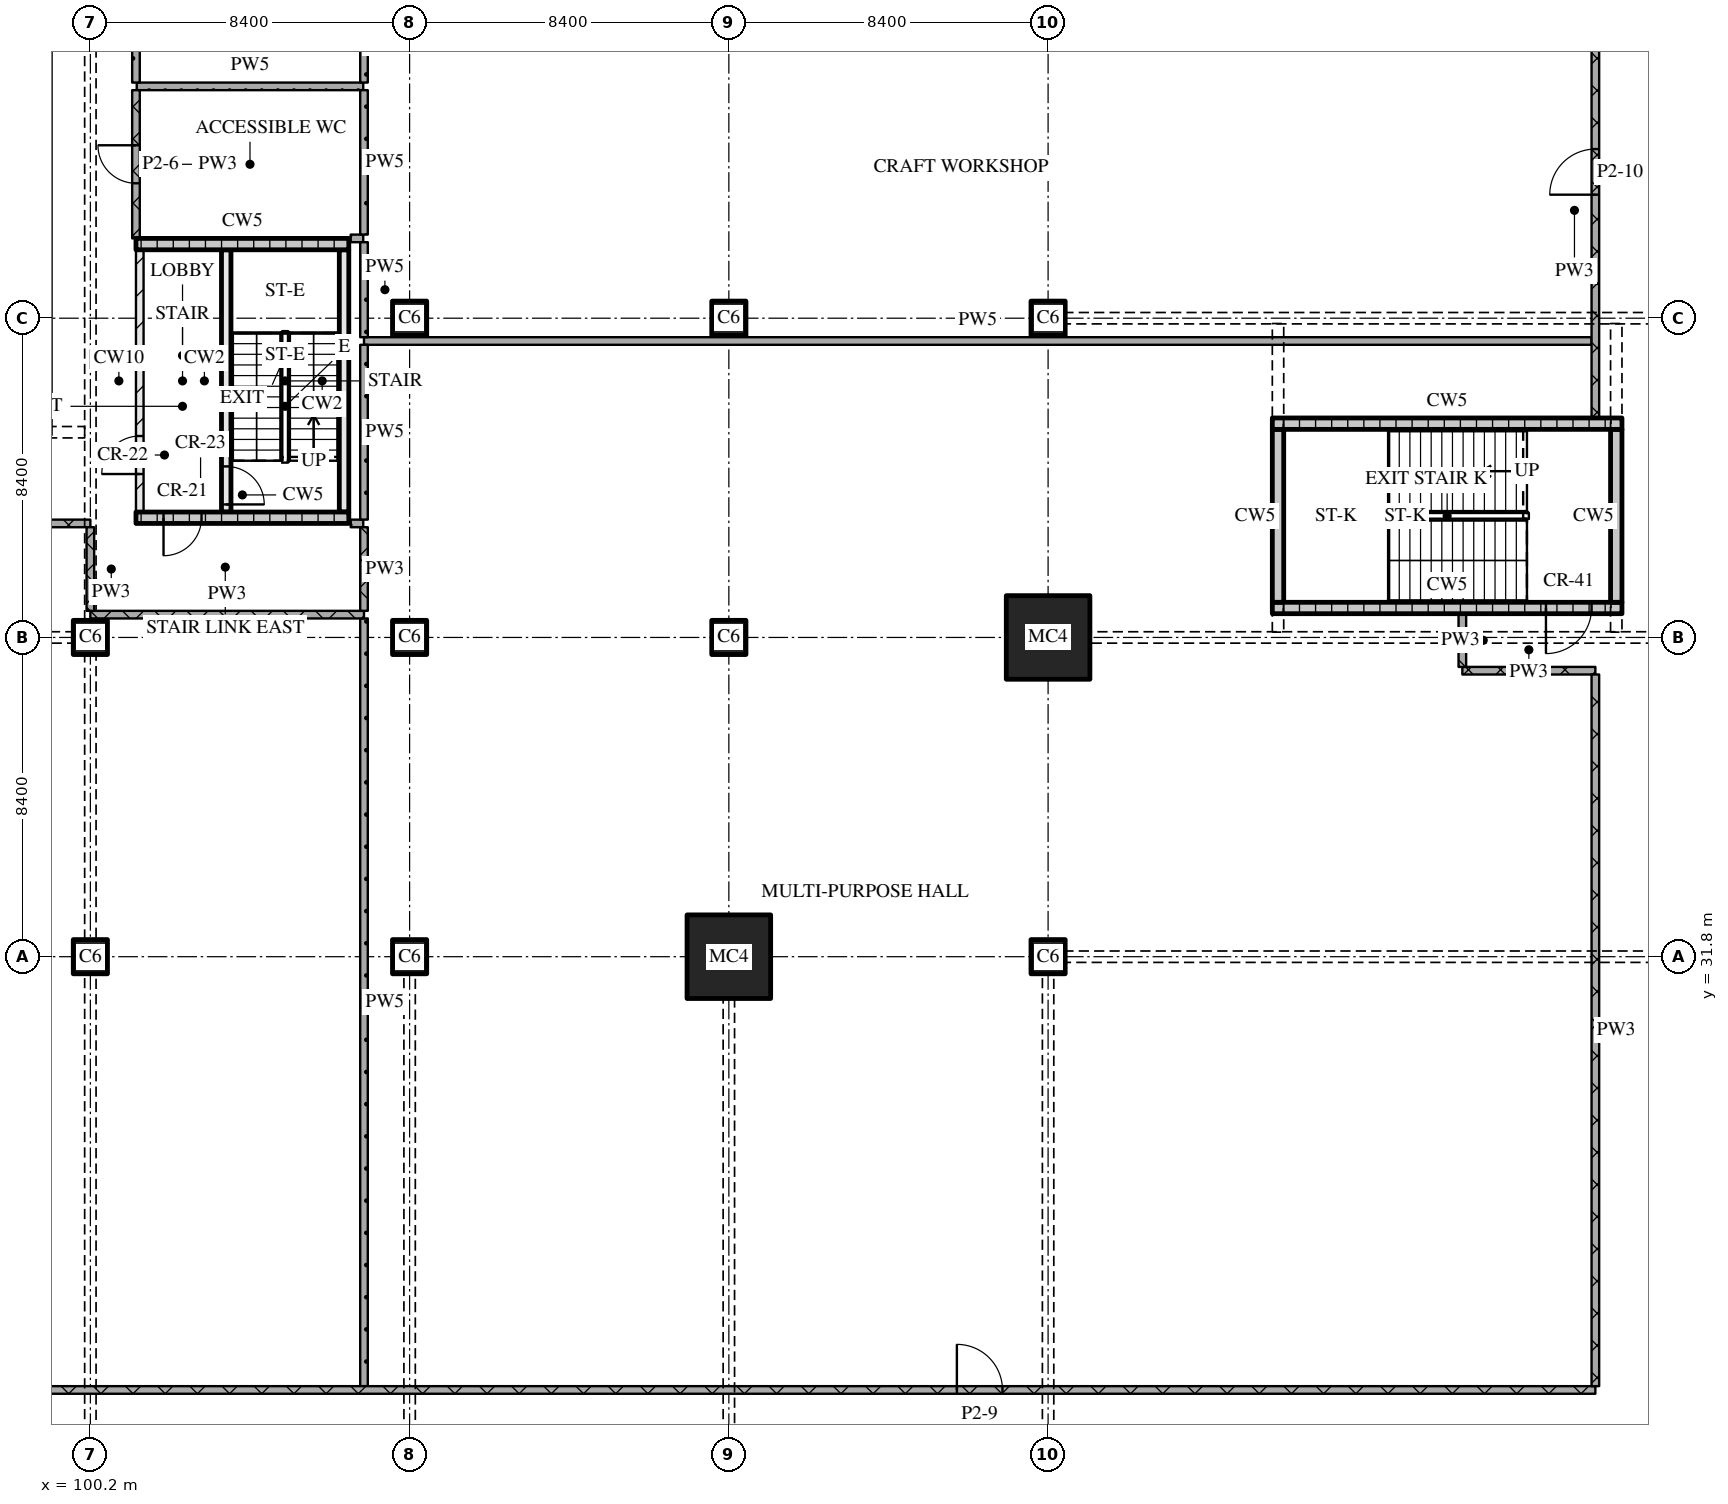
"""IFC4 building model, lengths in metres.
Left out: names, types, materials, properties, quantities, classifications, styles, units other than length and angle.
Written with IfcOpenShell. Run it as: python <this file> out.ifc"""

import sys

from ifc_helpers import new_model, si_unit, direction, frame, frame_2d, origin, origin_2d, place, context, subcontext, project, spatial, rectangle, extrude, element, fill, save


model = new_model("IFC4")
c1 = context("Model", 3, precision=1e-05, world=origin(), true_north=direction((0.0, 1.0)))
c2 = subcontext(c1, "Body", "Model", "MODEL_VIEW")
j1 = project(units=[si_unit("LENGTHUNIT", "METRE"), si_unit("PLANEANGLEUNIT", "RADIAN")], contexts=[c1])
p1 = place(None, origin())
s1 = spatial("IfcSite", under=j1, at=p1, CompositionType="ELEMENT")
p2 = place(p1, origin())
s2 = spatial("IfcBuilding", under=s1, at=p2, CompositionType="ELEMENT")
p3 = place(p2, frame((0.0, 0.0, 14.4)))
s3 = spatial("IfcBuildingStorey", under=s2, at=p3, CompositionType="ELEMENT", Elevation=14.4)
for number, where, z_axis, x_axis in (
    (1, (100.2, 31.8, 0.0), (0.0, 0.0, 1.0), (1.0, 0.0, 0.0)),
    (2, (100.2, 40.2, 0.0), (0.0, 0.0, 1.0), (1.0, 0.0, 0.0)),
    (3, (108.6, 31.8, 0.0), (0.0, 0.0, 1.0), (1.0, 0.0, 0.0)),
    (4, (108.6, 40.2, 0.0), (0.0, 0.0, 1.0), (1.0, 0.0, 0.0)),
    (5, (108.6, 48.6, 0.0), (0.0, 0.0, 1.0), (1.0, 0.0, 0.0)),
):
    element("IfcColumn", number, at=place(p3, frame(where, z_axis=z_axis, x_axis=x_axis)), inside=s3, PredefinedType="COLUMN", context=c2, shape_type="SweptSolid", body=[
        extrude(rectangle(XDim=0.9, YDim=0.9, at=origin_2d()), origin(), (0.0, 0.0, 1.0), 4.8),
    ])
p4 = place(p3, frame((117.0, 31.8, 0.0), z_axis=(0.0, 0.0, 1.0), x_axis=(1.0, 0.0, 0.0)))
e6 = element("IfcColumn", 6, at=p4, inside=s3, PredefinedType="COLUMN", context=c2, shape_type="SweptSolid", body=[
    extrude(rectangle(XDim=2.2, YDim=2.2, at=origin_2d()), origin(), (0.0, 0.0, 1.0), 4.8),
])
for number, where, z_axis, x_axis in (
    (7, (117.0, 40.2, 0.0), (0.0, 0.0, 1.0), (1.0, 0.0, 0.0)),
    (8, (117.0, 48.6, 0.0), (0.0, 0.0, 1.0), (1.0, 0.0, 0.0)),
    (9, (125.4, 31.8, 0.0), (0.0, 0.0, 1.0), (1.0, 0.0, 0.0)),
):
    element("IfcColumn", number, at=place(p3, frame(where, z_axis=z_axis, x_axis=x_axis)), inside=s3, PredefinedType="COLUMN", context=c2, shape_type="SweptSolid", body=[
        extrude(rectangle(XDim=0.9, YDim=0.9, at=origin_2d()), origin(), (0.0, 0.0, 1.0), 4.8),
    ])
p5 = place(p3, frame((125.4, 40.2, 0.0), z_axis=(0.0, 0.0, 1.0), x_axis=(1.0, 0.0, 0.0)))
e10 = element("IfcColumn", 10, at=p5, inside=s3, PredefinedType="COLUMN", context=c2, shape_type="SweptSolid", body=[
    extrude(rectangle(XDim=2.2, YDim=2.2, at=origin_2d()), origin(), (0.0, 0.0, 1.0), 4.8),
])
p6 = place(p3, frame((125.4, 48.6, 0.0), z_axis=(0.0, 0.0, 1.0), x_axis=(1.0, 0.0, 0.0)))
e11 = element("IfcColumn", 11, at=p6, inside=s3, PredefinedType="COLUMN", context=c2, shape_type="SweptSolid", body=[
    extrude(rectangle(XDim=0.9, YDim=0.9, at=origin_2d()), origin(), (0.0, 0.0, 1.0), 4.8),
])
p7 = place(p3, frame((101.4, 43.35, 0.0), z_axis=(0.0, 0.0, 1.0), x_axis=(1.0, 0.0, 0.0)))
e12 = element("IfcWall", 12, at=p7, inside=s3, PredefinedType="SOLIDWALL", context=c2, shape_type="SweptSolid", body=[
    extrude(rectangle(XDim=5.6, YDim=0.3, at=frame_2d((2.8, 0.0))), origin(), (0.0, 0.0, 1.0), 4.5),
])
p8 = place(p7, frame((0.725, 0.0, 0.0)))
e13 = element("IfcOpeningElement", 13, at=p8, cuts=e12, PredefinedType="OPENING", context=c2, shape_type="SweptSolid", body=[
    extrude(rectangle(XDim=1.0, YDim=2.1, at=frame_2d((0.5, 1.05))), frame((0.0, 0.16, 0.0), z_axis=(0.0, -1.0, 0.0), x_axis=(1.0, 0.0, 0.0)), (0.0, 0.0, 1.0), 0.32),
])
p9 = place(p3, frame((101.5, 43.5, 0.0), z_axis=(0.0, 0.0, 1.0), x_axis=(0.0, 1.0, 0.0)))
e14 = element("IfcWall", 14, at=p9, inside=s3, PredefinedType="PARTITIONING", context=c2, shape_type="SweptSolid", body=[
    extrude(rectangle(XDim=6.9, YDim=0.2, at=frame_2d((3.45, 0.0))), origin(), (0.0, 0.0, 1.0), 4.5),
])
p10 = place(p9, frame((1.0, 0.0, 0.0)))
e15 = element("IfcOpeningElement", 15, at=p10, cuts=e14, PredefinedType="OPENING", context=c2, shape_type="SweptSolid", body=[
    extrude(rectangle(XDim=1.0, YDim=2.1, at=frame_2d((0.5, 1.05))), frame((0.0, 0.11, 0.0), z_axis=(0.0, -1.0, 0.0), x_axis=(1.0, 0.0, 0.0)), (0.0, 0.0, 1.0), 0.22),
])
p11 = place(p3, frame((103.775, 43.5, 0.0), z_axis=(0.0, 0.0, 1.0), x_axis=(0.0, 1.0, 0.0)))
e16 = element("IfcWall", 16, at=p11, inside=s3, PredefinedType="SOLIDWALL", context=c2, shape_type="SweptSolid", body=[
    extrude(rectangle(XDim=6.9, YDim=0.25, at=frame_2d((3.45, 0.0))), origin(), (0.0, 0.0, 1.0), 4.5),
])
p12 = place(p11, frame((0.2, 0.0, 0.0)))
e17 = element("IfcOpeningElement", 17, at=p12, cuts=e16, PredefinedType="OPENING", context=c2, shape_type="SweptSolid", body=[
    extrude(rectangle(XDim=1.0, YDim=2.1, at=frame_2d((0.5, 1.05))), frame((0.0, 0.135, 0.0), z_axis=(0.0, -1.0, 0.0), x_axis=(1.0, 0.0, 0.0)), (0.0, 0.0, 1.0), 0.27),
])
p13 = place(p3, frame((106.875, 43.5, 0.0), z_axis=(0.0, 0.0, 1.0), x_axis=(0.0, 1.0, 0.0)))
e18 = element("IfcWall", 18, at=p13, inside=s3, PredefinedType="SOLIDWALL", context=c2, shape_type="SweptSolid", body=[
    extrude(rectangle(XDim=6.9, YDim=0.25, at=frame_2d((3.45, 0.0))), origin(), (0.0, 0.0, 1.0), 4.5),
])
p14 = place(p3, frame((101.4, 50.55, 0.0), z_axis=(0.0, 0.0, 1.0), x_axis=(1.0, 0.0, 0.0)))
e19 = element("IfcWall", 19, at=p14, inside=s3, PredefinedType="SOLIDWALL", context=c2, shape_type="SweptSolid", body=[
    extrude(rectangle(XDim=5.6, YDim=0.3, at=frame_2d((2.8, 0.0))), origin(), (0.0, 0.0, 1.0), 4.5),
])
p15 = place(p3, frame((131.3, 40.975, 0.0), z_axis=(0.0, 0.0, 1.0), x_axis=(1.0, 0.0, 0.0)))
e20 = element("IfcWall", 20, at=p15, inside=s3, PredefinedType="SOLIDWALL", context=c2, shape_type="SweptSolid", body=[
    extrude(rectangle(XDim=9.2, YDim=0.3, at=frame_2d((4.6, 0.0))), origin(), (0.0, 0.0, 1.0), 4.5),
])
p16 = place(p15, frame((7.2, 0.0, 0.0)))
e21 = element("IfcOpeningElement", 21, at=p16, cuts=e20, PredefinedType="OPENING", context=c2, shape_type="SweptSolid", body=[
    extrude(rectangle(XDim=1.2, YDim=2.1, at=frame_2d((0.6, 1.05))), frame((0.0, 0.16, 0.0), z_axis=(0.0, -1.0, 0.0), x_axis=(1.0, 0.0, 0.0)), (0.0, 0.0, 1.0), 0.32),
])
for number, where, z_axis, x_axis in (
    (22, (131.45, 41.125, 0.0), (0.0, 0.0, 1.0), (0.0, 1.0, 0.0)),
    (23, (140.35, 41.125, 0.0), (0.0, 0.0, 1.0), (0.0, 1.0, 0.0)),
):
    element("IfcWall", number, at=place(p3, frame(where, z_axis=z_axis, x_axis=x_axis)), inside=s3, PredefinedType="SOLIDWALL", context=c2, shape_type="SweptSolid", body=[
        extrude(rectangle(XDim=4.55, YDim=0.3, at=frame_2d((2.275, 0.0))), origin(), (0.0, 0.0, 1.0), 4.5),
    ])
p17 = place(p3, frame((131.3, 45.825, 0.0), z_axis=(0.0, 0.0, 1.0), x_axis=(1.0, 0.0, 0.0)))
e24 = element("IfcWall", 24, at=p17, inside=s3, PredefinedType="SOLIDWALL", context=c2, shape_type="SweptSolid", body=[
    extrude(rectangle(XDim=9.2, YDim=0.3, at=frame_2d((4.6, 0.0))), origin(), (0.0, 0.0, 1.0), 4.5),
])
p18 = place(p3, frame((35.4, 20.4, 0.0), z_axis=(0.0, 0.0, 1.0), x_axis=(1.0, 0.0, 0.0)))
e25 = element("IfcWall", 25, at=p18, inside=s3, PredefinedType="PARTITIONING", context=c2, shape_type="SweptSolid", body=[
    extrude(rectangle(XDim=104.4, YDim=0.2, at=frame_2d((52.2, 0.0))), origin(), (0.0, 0.0, 1.0), 4.5),
])
p19 = place(p18, frame((41.9, 0.0, 0.0)))
e26 = element("IfcOpeningElement", 26, at=p19, cuts=e25, PredefinedType="OPENING", context=c2, shape_type="SweptSolid", body=[
    extrude(rectangle(XDim=1.2, YDim=2.1, at=frame_2d((0.6, 1.05))), frame((0.0, 0.11, 0.0), z_axis=(0.0, -1.0, 0.0), x_axis=(1.0, 0.0, 0.0)), (0.0, 0.0, 1.0), 0.22),
])
p20 = place(p18, frame((61.7, 0.0, 0.0)))
e27 = element("IfcOpeningElement", 27, at=p20, cuts=e25, PredefinedType="OPENING", context=c2, shape_type="SweptSolid", body=[
    extrude(rectangle(XDim=1.2, YDim=2.1, at=frame_2d((0.6, 1.05))), frame((0.0, 0.11, 0.0), z_axis=(0.0, -1.0, 0.0), x_axis=(1.0, 0.0, 0.0)), (0.0, 0.0, 1.0), 0.22),
])
p21 = place(p18, frame((87.6, 0.0, 0.0)))
e28 = element("IfcOpeningElement", 28, at=p21, cuts=e25, PredefinedType="OPENING", context=c2, shape_type="SweptSolid", body=[
    extrude(rectangle(XDim=1.2, YDim=2.1, at=frame_2d((0.6, 1.05))), frame((0.0, 0.11, 0.0), z_axis=(0.0, -1.0, 0.0), x_axis=(1.0, 0.0, 0.0)), (0.0, 0.0, 1.0), 0.22),
])
p22 = place(p3, frame((136.3, 39.325, 0.0), z_axis=(0.0, 0.0, 1.0), x_axis=(1.0, 0.0, 0.0)))
e29 = element("IfcWall", 29, at=p22, inside=s3, PredefinedType="PARTITIONING", context=c2, shape_type="SweptSolid", body=[
    extrude(rectangle(XDim=3.5, YDim=0.2, at=frame_2d((1.75, 0.0))), origin(), (0.0, 0.0, 1.0), 4.5),
])
p23 = place(p3, frame((100.2, 40.8, 0.0), z_axis=(0.0, 0.0, 1.0), x_axis=(1.0, 0.0, 0.0)))
e30 = element("IfcWall", 30, at=p23, inside=s3, PredefinedType="PARTITIONING", context=c2, shape_type="SweptSolid", body=[
    extrude(rectangle(XDim=7.2, YDim=0.2, at=frame_2d((3.6, 0.0))), origin(), (0.0, 0.0, 1.0), 4.5),
])
p24 = place(p3, frame((75.0, 43.2, 0.0), z_axis=(0.0, 0.0, 1.0), x_axis=(1.0, 0.0, 0.0)))
e31 = element("IfcWall", 31, at=p24, inside=s3, PredefinedType="PARTITIONING", context=c2, shape_type="SweptSolid", body=[
    extrude(rectangle(XDim=25.2, YDim=0.2, at=frame_2d((12.6, 0.0))), origin(), (0.0, 0.0, 1.0), 4.5),
])
p25 = place(p3, frame((107.05, 43.2, 0.0), z_axis=(0.0, 0.0, 1.0), x_axis=(1.0, 0.0, 0.0)))
e32 = element("IfcWall", 32, at=p25, inside=s3, PredefinedType="PARTITIONING", context=c2, shape_type="SweptSolid", body=[
    extrude(rectangle(XDim=0.33, YDim=0.2, at=frame_2d((0.165, 0.0))), origin(), (0.0, 0.0, 1.0), 4.5),
])
p26 = place(p3, frame((107.4, 48.0, 0.0), z_axis=(0.0, 0.0, 1.0), x_axis=(1.0, 0.0, 0.0)))
e33 = element("IfcWall", 33, at=p26, inside=s3, PredefinedType="PARTITIONING", context=c2, shape_type="SweptSolid", body=[
    extrude(rectangle(XDim=32.3, YDim=0.2, at=frame_2d((16.15, 0.0))), origin(), (0.0, 0.0, 1.0), 4.5),
])
p27 = place(p3, frame((107.05, 50.7, 0.0), z_axis=(0.0, 0.0, 1.0), x_axis=(1.0, 0.0, 0.0)))
e34 = element("IfcWall", 34, at=p27, inside=s3, PredefinedType="PARTITIONING", context=c2, shape_type="SweptSolid", body=[
    extrude(rectangle(XDim=0.33, YDim=0.2, at=frame_2d((0.165, 0.0))), origin(), (0.0, 0.0, 1.0), 4.5),
])
p28 = place(p3, frame((101.42, 54.7, 0.0), z_axis=(0.0, 0.0, 1.0), x_axis=(1.0, 0.0, 0.0)))
e35 = element("IfcWall", 35, at=p28, inside=s3, PredefinedType="PARTITIONING", context=c2, shape_type="SweptSolid", body=[
    extrude(rectangle(XDim=5.96, YDim=0.2, at=frame_2d((2.98, 0.0))), origin(), (0.0, 0.0, 1.0), 4.5),
])
p29 = place(p3, frame((100.2, 43.1, 0.0), z_axis=(0.0, 0.0, 1.0), x_axis=(0.0, -1.0, 0.0)))
e36 = element("IfcWall", 36, at=p29, inside=s3, PredefinedType="PARTITIONING", context=c2, shape_type="SweptSolid", body=[
    extrude(rectangle(XDim=2.2, YDim=0.2, at=frame_2d((1.1, 0.0))), origin(), (0.0, 0.0, 1.0), 3.6),
])
p30 = place(p3, frame((101.4, 54.6, 0.0), z_axis=(0.0, 0.0, 1.0), x_axis=(0.0, -1.0, 0.0)))
e37 = element("IfcWall", 37, at=p30, inside=s3, PredefinedType="PARTITIONING", context=c2, shape_type="SweptSolid", body=[
    extrude(rectangle(XDim=3.9, YDim=0.2, at=frame_2d((1.95, 0.0))), origin(), (0.0, 0.0, 1.0), 4.5),
])
p31 = place(p30, frame((1.45, 0.0, 0.0)))
e38 = element("IfcOpeningElement", 38, at=p31, cuts=e37, PredefinedType="OPENING", context=c2, shape_type="SweptSolid", body=[
    extrude(rectangle(XDim=1.0, YDim=2.1, at=frame_2d((0.5, 1.05))), frame((0.0, 0.11, 0.0), z_axis=(0.0, -1.0, 0.0), x_axis=(1.0, 0.0, 0.0)), (0.0, 0.0, 1.0), 0.22),
])
p32 = place(p3, frame((101.4, 58.7, 0.0), z_axis=(0.0, 0.0, 1.0), x_axis=(0.0, -1.0, 0.0)))
e39 = element("IfcWall", 39, at=p32, inside=s3, PredefinedType="PARTITIONING", context=c2, shape_type="SweptSolid", body=[
    extrude(rectangle(XDim=3.9, YDim=0.2, at=frame_2d((1.95, 0.0))), origin(), (0.0, 0.0, 1.0), 4.5),
])
p33 = place(p3, frame((107.4, 43.1, 0.0), z_axis=(0.0, 0.0, 1.0), x_axis=(0.0, -1.0, 0.0)))
e40 = element("IfcWall", 40, at=p33, inside=s3, PredefinedType="PARTITIONING", context=c2, shape_type="SweptSolid", body=[
    extrude(rectangle(XDim=2.2, YDim=0.2, at=frame_2d((1.1, 0.0))), origin(), (0.0, 0.0, 1.0), 4.5),
])
p34 = place(p3, frame((107.4, 47.9, 0.0), z_axis=(0.0, 0.0, 1.0), x_axis=(0.0, -1.0, 0.0)))
e41 = element("IfcWall", 41, at=p34, inside=s3, PredefinedType="PARTITIONING", context=c2, shape_type="SweptSolid", body=[
    extrude(rectangle(XDim=4.6, YDim=0.2, at=frame_2d((2.3, 0.0))), origin(), (0.0, 0.0, 1.0), 4.5),
])
p35 = place(p3, frame((107.4, 50.6, 0.0), z_axis=(0.0, 0.0, 1.0), x_axis=(0.0, -1.0, 0.0)))
e42 = element("IfcWall", 42, at=p35, inside=s3, PredefinedType="PARTITIONING", context=c2, shape_type="SweptSolid", body=[
    extrude(rectangle(XDim=2.5, YDim=0.2, at=frame_2d((1.25, 0.0))), origin(), (0.0, 0.0, 1.0), 4.5),
])
p36 = place(p3, frame((107.4, 56.9, 0.0), z_axis=(0.0, 0.0, 1.0), x_axis=(0.0, -1.0, 0.0)))
e43 = element("IfcWall", 43, at=p36, inside=s3, PredefinedType="PARTITIONING", context=c2, shape_type="SweptSolid", body=[
    extrude(rectangle(XDim=2.1, YDim=0.2, at=frame_2d((1.05, 0.0))), origin(), (0.0, 0.0, 1.0), 4.5),
])
p37 = place(p3, frame((107.4, 40.7, 0.0), z_axis=(0.0, 0.0, 1.0), x_axis=(0.0, -1.0, 0.0)))
e44 = element("IfcWall", 44, at=p37, inside=s3, PredefinedType="PARTITIONING", context=c2, shape_type="SweptSolid", body=[
    extrude(rectangle(XDim=20.2, YDim=0.2, at=frame_2d((10.1, 0.0))), origin(), (0.0, 0.0, 1.0), 4.5),
])
p38 = place(p3, frame((107.4, 54.6, 0.0), z_axis=(0.0, 0.0, 1.0), x_axis=(0.0, -1.0, 0.0)))
e45 = element("IfcWall", 45, at=p38, inside=s3, PredefinedType="PARTITIONING", context=c2, shape_type="SweptSolid", body=[
    extrude(rectangle(XDim=3.8, YDim=0.2, at=frame_2d((1.9, 0.0))), origin(), (0.0, 0.0, 1.0), 4.5),
])
p39 = place(p3, frame((136.3, 40.825, 0.0), z_axis=(0.0, 0.0, 1.0), x_axis=(0.0, -1.0, 0.0)))
e46 = element("IfcWall", 46, at=p39, inside=s3, PredefinedType="PARTITIONING", context=c2, shape_type="SweptSolid", body=[
    extrude(rectangle(XDim=1.4, YDim=0.2, at=frame_2d((0.7, 0.0))), origin(), (0.0, 0.0, 1.0), 4.5),
])
p40 = place(p3, frame((139.8, 39.225, 0.0), z_axis=(0.0, 0.0, 1.0), x_axis=(0.0, -1.0, 0.0)))
e47 = element("IfcWall", 47, at=p40, inside=s3, PredefinedType="PARTITIONING", context=c2, shape_type="SweptSolid", body=[
    extrude(rectangle(XDim=18.725, YDim=0.2, at=frame_2d((9.363, 0.0))), origin(), (0.0, 0.0, 1.0), 4.5),
])
p41 = place(p3, frame((139.8, 45.975, 0.0), z_axis=(0.0, 0.0, 1.0), x_axis=(0.0, 1.0, 0.0)))
e48 = element("IfcWall", 48, at=p41, inside=s3, PredefinedType="PARTITIONING", context=c2, shape_type="SweptSolid", body=[
    extrude(rectangle(XDim=10.925, YDim=0.2, at=frame_2d((5.462, 0.0))), origin(), (0.0, 0.0, 1.0), 4.5),
])
p42 = place(p41, frame((5.875, 0.0, 0.0)))
e49 = element("IfcOpeningElement", 49, at=p42, cuts=e48, PredefinedType="OPENING", context=c2, shape_type="SweptSolid", body=[
    extrude(rectangle(XDim=1.2, YDim=2.1, at=frame_2d((0.6, 1.05))), frame((0.0, 0.11, 0.0), z_axis=(0.0, -1.0, 0.0), x_axis=(1.0, 0.0, 0.0)), (0.0, 0.0, 1.0), 0.22),
])
p43 = place(p8, origin())
e50 = element("IfcDoor", 50, at=p43, inside=s3, OperationType="SINGLE_SWING_RIGHT", PredefinedType="DOOR", context=c2, shape_type="SweptSolid", body=[
    extrude(rectangle(XDim=1.0, YDim=2.1, at=frame_2d((0.5, 1.05))), frame((0.0, 0.025, 0.0), z_axis=(0.0, -1.0, 0.0), x_axis=(1.0, 0.0, 0.0)), (0.0, 0.0, 1.0), 0.05),
])
fill(e13, e50)
p44 = place(p12, origin())
e51 = element("IfcDoor", 51, at=p44, inside=s3, OperationType="SINGLE_SWING_RIGHT", PredefinedType="DOOR", context=c2, shape_type="SweptSolid", body=[
    extrude(rectangle(XDim=1.0, YDim=2.1, at=frame_2d((0.5, 1.05))), frame((0.0, 0.025, 0.0), z_axis=(0.0, -1.0, 0.0), x_axis=(1.0, 0.0, 0.0)), (0.0, 0.0, 1.0), 0.05),
])
fill(e17, e51)
p45 = place(p10, origin())
e52 = element("IfcDoor", 52, at=p45, inside=s3, OperationType="SINGLE_SWING_LEFT", PredefinedType="DOOR", context=c2, shape_type="SweptSolid", body=[
    extrude(rectangle(XDim=1.0, YDim=2.1, at=frame_2d((0.5, 1.05))), frame((0.0, 0.025, 0.0), z_axis=(0.0, -1.0, 0.0), x_axis=(1.0, 0.0, 0.0)), (0.0, 0.0, 1.0), 0.05),
])
fill(e15, e52)
p46 = place(p16, origin())
e53 = element("IfcDoor", 53, at=p46, inside=s3, OperationType="SINGLE_SWING_RIGHT", PredefinedType="DOOR", context=c2, shape_type="SweptSolid", body=[
    extrude(rectangle(XDim=1.2, YDim=2.1, at=frame_2d((0.6, 1.05))), frame((0.0, 0.025, 0.0), z_axis=(0.0, -1.0, 0.0), x_axis=(1.0, 0.0, 0.0)), (0.0, 0.0, 1.0), 0.05),
])
fill(e21, e53)
p47 = place(p21, origin())
e54 = element("IfcDoor", 54, at=p47, inside=s3, OperationType="SINGLE_SWING_LEFT", PredefinedType="DOOR", context=c2, shape_type="SweptSolid", body=[
    extrude(rectangle(XDim=1.2, YDim=2.1, at=frame_2d((0.6, 1.05))), frame((0.0, 0.025, 0.0), z_axis=(0.0, -1.0, 0.0), x_axis=(1.0, 0.0, 0.0)), (0.0, 0.0, 1.0), 0.05),
])
fill(e28, e54)
p48 = place(p31, origin())
e55 = element("IfcDoor", 55, at=p48, inside=s3, OperationType="SINGLE_SWING_RIGHT", PredefinedType="DOOR", context=c2, shape_type="SweptSolid", body=[
    extrude(rectangle(XDim=1.0, YDim=2.1, at=frame_2d((0.5, 1.05))), frame((0.0, 0.025, 0.0), z_axis=(0.0, -1.0, 0.0), x_axis=(1.0, 0.0, 0.0)), (0.0, 0.0, 1.0), 0.05),
])
fill(e38, e55)
p49 = place(p42, origin())
e56 = element("IfcDoor", 56, at=p49, inside=s3, OperationType="SINGLE_SWING_LEFT", PredefinedType="DOOR", context=c2, shape_type="SweptSolid", body=[
    extrude(rectangle(XDim=1.2, YDim=2.1, at=frame_2d((0.6, 1.05))), frame((0.0, 0.025, 0.0), z_axis=(0.0, -1.0, 0.0), x_axis=(1.0, 0.0, 0.0)), (0.0, 0.0, 1.0), 0.05),
])
fill(e49, e56)
save(model, sys.argv[1])
